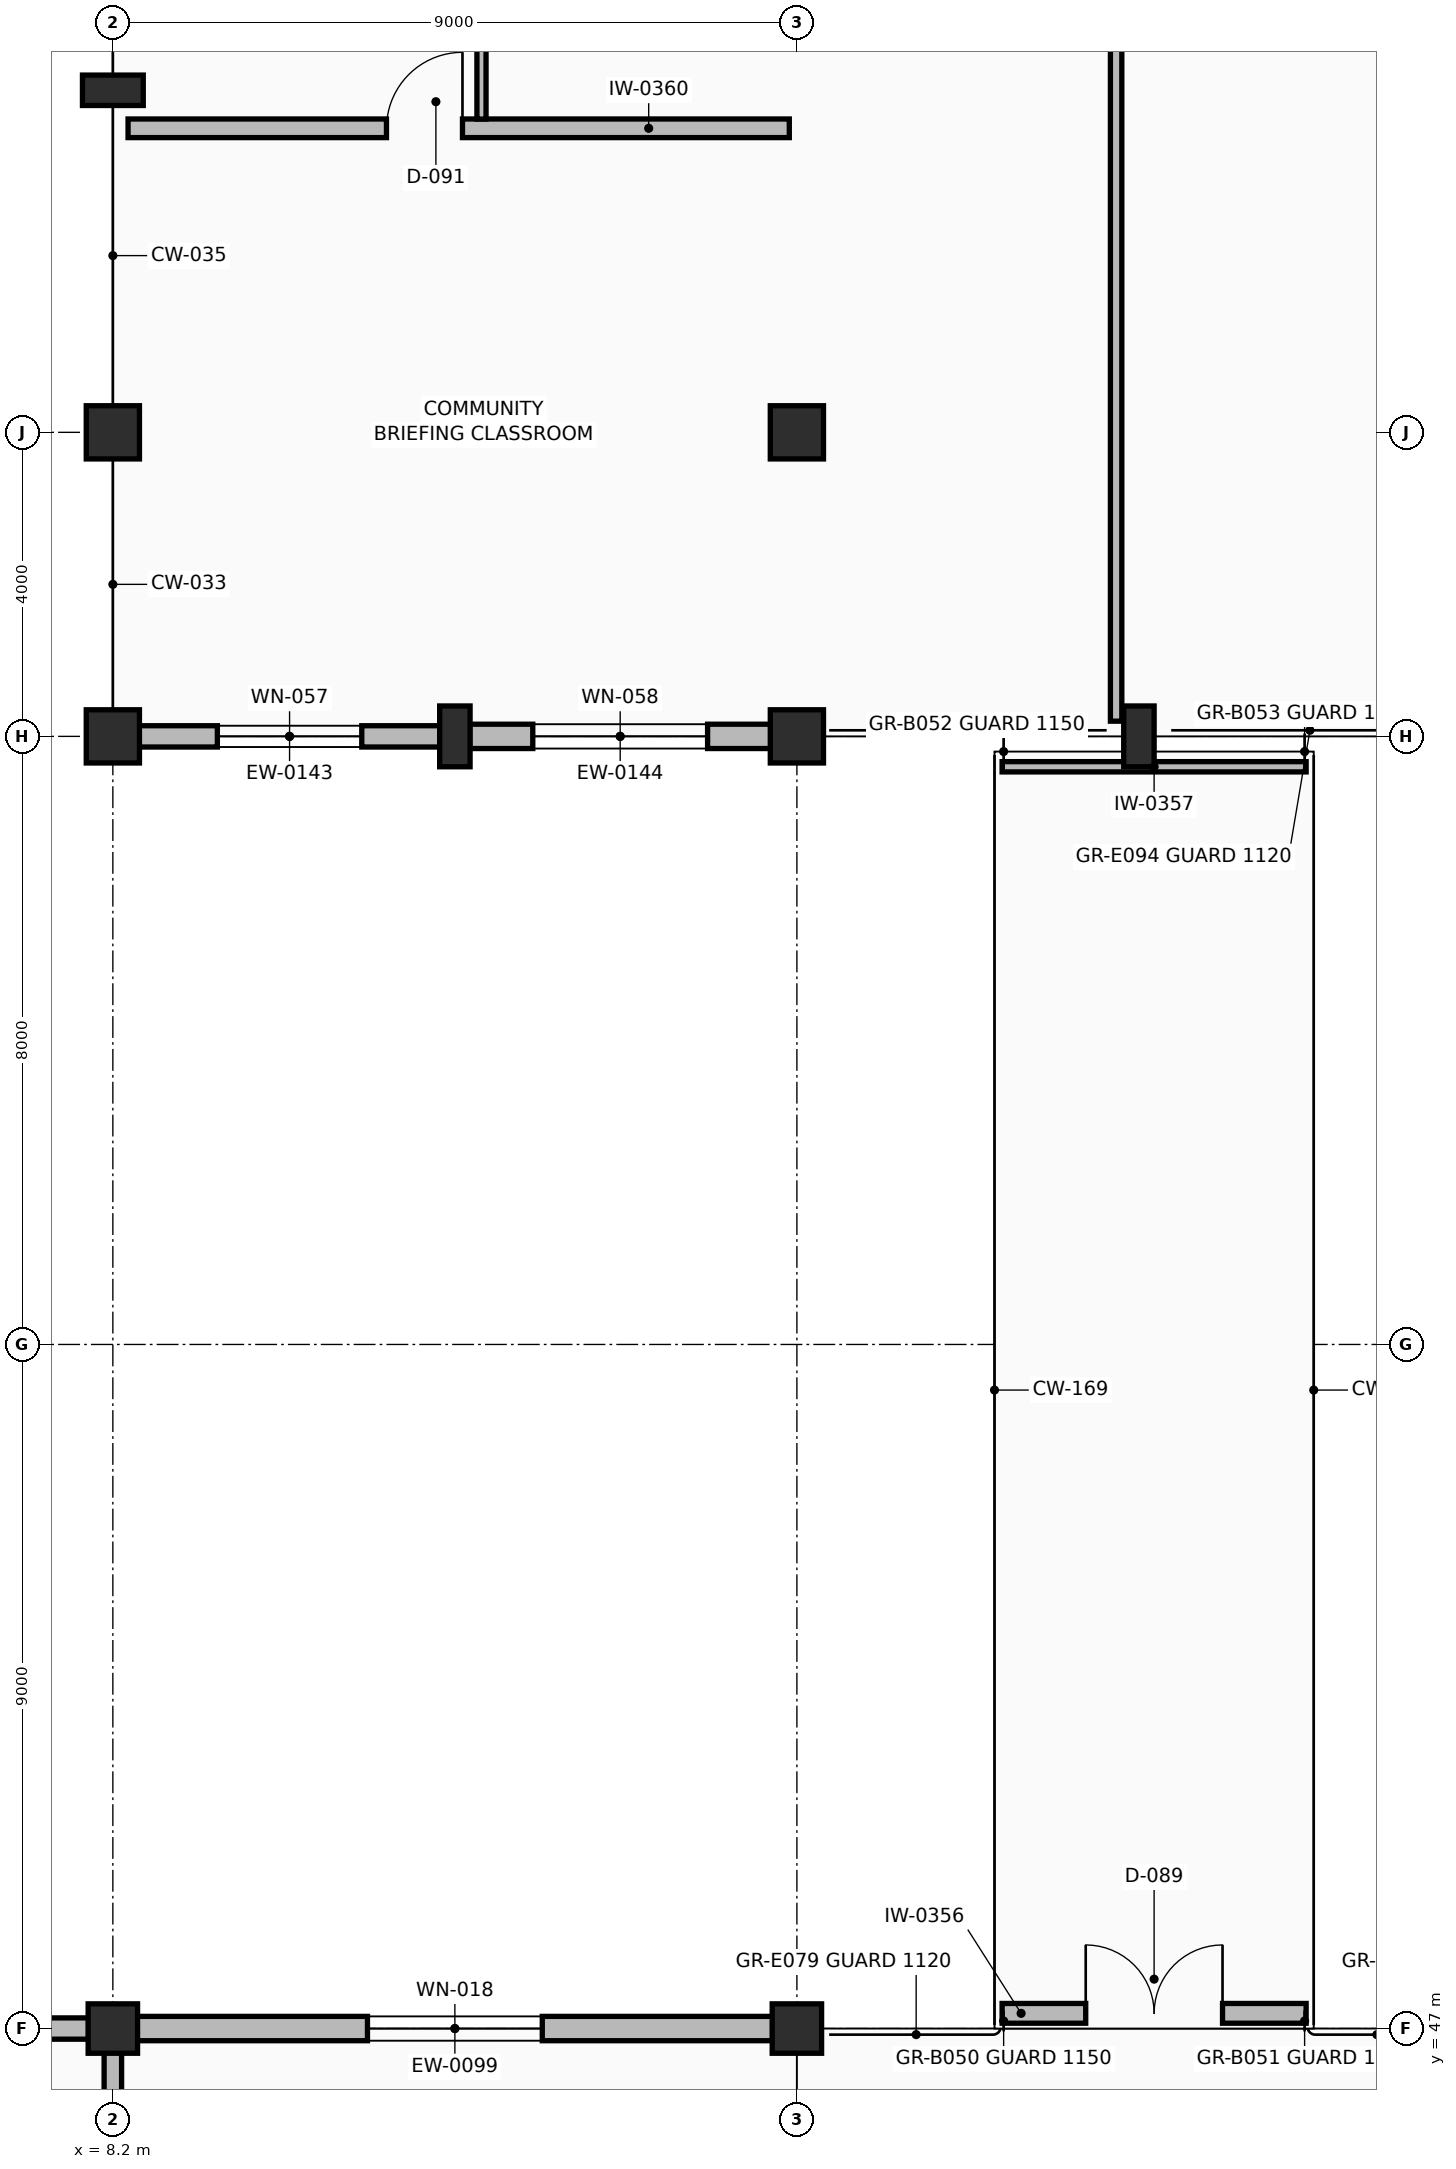
"""IFC4 building model, lengths in metres.
Left out: names, types, materials, properties, quantities, classifications, styles, units other than length and angle.
Written with IfcOpenShell. Run it as: python <this file> out.ifc"""

import sys

from ifc_helpers import new_model, si_unit, direction, frame, frame_2d, origin, origin_2d, place, context, subcontext, project, spatial, rectangle, extrude, element, fill, save


model = new_model("IFC4")
c1 = context("Model", 3, precision=1e-05, world=origin(), true_north=direction((0.0, 1.0)))
c2 = subcontext(c1, "Body", "Model", "MODEL_VIEW")
j1 = project(units=[si_unit("LENGTHUNIT", "METRE"), si_unit("PLANEANGLEUNIT", "RADIAN")], contexts=[c1])
p1 = place(None, origin())
s1 = spatial("IfcSite", under=j1, at=p1, CompositionType="ELEMENT")
p2 = place(p1, origin())
s2 = spatial("IfcBuilding", under=s1, at=p2, CompositionType="ELEMENT")
p3 = place(p2, frame((0.0, 0.0, 4.8)))
s3 = spatial("IfcBuildingStorey", under=s2, at=p3, CompositionType="ELEMENT", Elevation=4.8)
for number, where, z_axis, x_axis in (
    (1, (8.2, 47.0, 0.0), (0.0, 0.0, 1.0), (1.0, 0.0, 0.0)),
    (2, (17.2, 47.0, 0.0), (0.0, 0.0, 1.0), (1.0, 0.0, 0.0)),
):
    element("IfcColumn", number, at=place(p3, frame(where, z_axis=z_axis, x_axis=x_axis)), inside=s3, PredefinedType="COLUMN", context=c2, shape_type="SweptSolid", body=[
        extrude(rectangle(XDim=0.65, YDim=0.65, at=origin_2d()), origin(), (0.0, 0.0, 1.0), 4.8),
    ])
for number, where, z_axis, x_axis in (
    (3, (8.2, 64.0, 0.0), (0.0, 0.0, 1.0), (1.0, 0.0, 0.0)),
    (4, (8.2, 68.0, 0.0), (0.0, 0.0, 1.0), (1.0, 0.0, 0.0)),
    (5, (17.2, 64.0, 0.0), (0.0, 0.0, 1.0), (1.0, 0.0, 0.0)),
    (6, (17.2, 68.0, 0.0), (0.0, 0.0, 1.0), (1.0, 0.0, 0.0)),
):
    element("IfcColumn", number, at=place(p3, frame(where, z_axis=z_axis, x_axis=x_axis)), inside=s3, PredefinedType="COLUMN", context=c2, shape_type="SweptSolid", body=[
        extrude(rectangle(XDim=0.7, YDim=0.7, at=origin_2d()), origin(), (0.0, 0.0, 1.0), 4.8),
    ])
for number, where, z_axis, x_axis in (
    (7, (12.7, 64.0, 0.0), (0.0, 0.0, 1.0), (1.0, 0.0, 0.0)),
    (8, (21.7, 64.0, 0.0), (0.0, 0.0, 1.0), (1.0, 0.0, 0.0)),
    (9, (8.2, 72.5, 0.0), (0.0, 0.0, 1.0), (0.0, 1.0, 0.0)),
):
    element("IfcColumn", number, at=place(p3, frame(where, z_axis=z_axis, x_axis=x_axis)), inside=s3, PredefinedType="PILASTER", context=c2, shape_type="SweptSolid", body=[
        extrude(rectangle(XDim=0.4, YDim=0.8, at=origin_2d()), origin(), (0.0, 0.0, 1.0), 4.8),
    ])
p4 = place(p3, frame((7.88, 47.0, 0.0), z_axis=(0.0, 0.0, 1.0), x_axis=(-1.0, 0.0, 0.0)))
e10 = element("IfcWall", 10, at=p4, inside=s3, PredefinedType="SOLIDWALL", context=c2, shape_type="SweptSolid", body=[
    extrude(rectangle(XDim=4.56, YDim=0.28, at=frame_2d((2.28, 0.0))), origin(), (0.0, 0.0, 1.0), 3.675),
])
p5 = place(p4, frame((1.33, 0.0, 0.9)))
e11 = element("IfcOpeningElement", 11, at=p5, cuts=e10, PredefinedType="OPENING", context=c2, shape_type="SweptSolid", body=[
    extrude(rectangle(XDim=1.9, YDim=1.55, at=frame_2d((0.95, 0.775))), frame((0.0, 0.15, 0.0), z_axis=(0.0, -1.0, 0.0), x_axis=(1.0, 0.0, 0.0)), (0.0, 0.0, 1.0), 0.3),
])
p6 = place(p3, frame((16.88, 47.0, 0.0), z_axis=(0.0, 0.0, 1.0), x_axis=(-1.0, 0.0, 0.0)))
e12 = element("IfcWall", 12, at=p6, inside=s3, PredefinedType="SOLIDWALL", context=c2, shape_type="SweptSolid", body=[
    extrude(rectangle(XDim=8.36, YDim=0.32, at=frame_2d((4.18, 0.0))), origin(), (0.0, 0.0, 1.0), 2.752),
])
p7 = place(p6, frame((3.03, 0.0, 0.9)))
e13 = element("IfcOpeningElement", 13, at=p7, cuts=e12, PredefinedType="OPENING", context=c2, shape_type="SweptSolid", body=[
    extrude(rectangle(XDim=2.3, YDim=1.5, at=frame_2d((1.15, 0.75))), frame((0.0, 0.17, 0.0), z_axis=(0.0, -1.0, 0.0), x_axis=(1.0, 0.0, 0.0)), (0.0, 0.0, 1.0), 0.34),
])
p8 = place(p3, frame((8.545, 64.0, 0.0), z_axis=(0.0, 0.0, 1.0), x_axis=(1.0, 0.0, 0.0)))
e14 = element("IfcWall", 14, at=p8, inside=s3, PredefinedType="SOLIDWALL", context=c2, shape_type="SweptSolid", body=[
    extrude(rectangle(XDim=3.96, YDim=0.28, at=frame_2d((1.98, 0.0))), origin(), (0.0, 0.0, 1.0), 2.752),
])
p9 = place(p8, frame((1.03, 0.0, 0.9)))
e15 = element("IfcOpeningElement", 15, at=p9, cuts=e14, PredefinedType="OPENING", context=c2, shape_type="SweptSolid", body=[
    extrude(rectangle(XDim=1.9, YDim=1.55, at=frame_2d((0.95, 0.775))), frame((0.0, 0.15, 0.0), z_axis=(0.0, -1.0, 0.0), x_axis=(1.0, 0.0, 0.0)), (0.0, 0.0, 1.0), 0.3),
])
p10 = place(p3, frame((12.895, 64.0, 0.0), z_axis=(0.0, 0.0, 1.0), x_axis=(1.0, 0.0, 0.0)))
e16 = element("IfcWall", 16, at=p10, inside=s3, PredefinedType="SOLIDWALL", context=c2, shape_type="SweptSolid", body=[
    extrude(rectangle(XDim=3.96, YDim=0.32, at=frame_2d((1.98, 0.0))), origin(), (0.0, 0.0, 1.0), 2.752),
])
p11 = place(p10, frame((0.83, 0.0, 0.9)))
e17 = element("IfcOpeningElement", 17, at=p11, cuts=e16, PredefinedType="OPENING", context=c2, shape_type="SweptSolid", body=[
    extrude(rectangle(XDim=2.3, YDim=1.5, at=frame_2d((1.15, 0.75))), frame((0.0, 0.17, 0.0), z_axis=(0.0, -1.0, 0.0), x_axis=(1.0, 0.0, 0.0)), (0.0, 0.0, 1.0), 0.34),
])
p12 = place(p3, frame((8.2, 30.098, 0.0), z_axis=(0.0, 0.0, 1.0), x_axis=(0.0, 1.0, 0.0)))
e18 = element("IfcWall", 18, at=p12, inside=s3, PredefinedType="PARTITIONING", context=c2, shape_type="SweptSolid", body=[
    extrude(rectangle(XDim=16.702, YDim=0.23, at=frame_2d((8.351, 0.0))), origin(), (0.0, 0.0, 1.0), 3.6),
])
p13 = place(p12, frame((8.726, 0.0, 0.0)))
e19 = element("IfcOpeningElement", 19, at=p13, cuts=e18, PredefinedType="OPENING", context=c2, shape_type="SweptSolid", body=[
    extrude(rectangle(XDim=1.05, YDim=2.15, at=frame_2d((0.525, 1.075))), frame((0.0, 0.125, 0.0), z_axis=(0.0, -1.0, 0.0), x_axis=(1.0, 0.0, 0.0)), (0.0, 0.0, 1.0), 0.25),
])
p14 = place(p3, frame((19.9, 47.2, 0.0), z_axis=(0.0, 0.0, 1.0), x_axis=(1.0, 0.0, 0.0)))
e20 = element("IfcWall", 20, at=p14, inside=s3, PredefinedType="PARTITIONING", context=c2, shape_type="SweptSolid", body=[
    extrude(rectangle(XDim=4.0, YDim=0.26, at=frame_2d((2.0, 0.0))), origin(), (0.0, 0.0, 1.0), 2.742),
])
p15 = place(p14, frame((1.1, 0.0, 0.0)))
e21 = element("IfcOpeningElement", 21, at=p15, cuts=e20, PredefinedType="OPENING", context=c2, shape_type="SweptSolid", body=[
    extrude(rectangle(XDim=1.8, YDim=2.3, at=frame_2d((0.9, 1.15))), frame((0.0, 0.14, 0.0), z_axis=(0.0, -1.0, 0.0), x_axis=(1.0, 0.0, 0.0)), (0.0, 0.0, 1.0), 0.28),
])
p16 = place(p3, frame((19.9, 63.6, 0.0), z_axis=(0.0, 0.0, 1.0), x_axis=(1.0, 0.0, 0.0)))
e22 = element("IfcWall", 22, at=p16, inside=s3, PredefinedType="PARTITIONING", context=c2, shape_type="SweptSolid", body=[
    extrude(rectangle(XDim=4.0, YDim=0.135, at=frame_2d((2.0, 0.0))), origin(), (0.0, 0.0, 1.0), 2.742),
])
p17 = place(p3, frame((8.4, 72.0, 0.0), z_axis=(0.0, 0.0, 1.0), x_axis=(1.0, 0.0, 0.0)))
e23 = element("IfcWall", 23, at=p17, inside=s3, PredefinedType="PARTITIONING", context=c2, shape_type="SweptSolid", body=[
    extrude(rectangle(XDim=8.7, YDim=0.245, at=frame_2d((4.35, 0.0))), origin(), (0.0, 0.0, 1.0), 3.762),
])
p18 = place(p17, frame((3.4, 0.0, 0.0)))
e24 = element("IfcOpeningElement", 24, at=p18, cuts=e23, PredefinedType="OPENING", context=c2, shape_type="SweptSolid", body=[
    extrude(rectangle(XDim=1.0, YDim=2.15, at=frame_2d((0.5, 1.075))), frame((0.0, 0.133, 0.0), z_axis=(0.0, -1.0, 0.0), x_axis=(1.0, 0.0, 0.0)), (0.0, 0.0, 1.0), 0.265),
])
p19 = place(p3, frame((13.05, 72.121, 0.0), z_axis=(0.0, 0.0, 1.0), x_axis=(0.0, 1.0, 0.0)))
e25 = element("IfcWall", 25, at=p19, inside=s3, PredefinedType="PARTITIONING", context=c2, shape_type="SweptSolid", body=[
    extrude(rectangle(XDim=5.199, YDim=0.12, at=frame_2d((2.6, 0.0))), origin(), (0.0, 0.0, 1.0), 3.762),
])
p20 = place(p19, frame((2.074, 0.0, 0.0)))
e26 = element("IfcOpeningElement", 26, at=p20, cuts=e25, PredefinedType="OPENING", context=c2, shape_type="SweptSolid", body=[
    extrude(rectangle(XDim=1.05, YDim=2.15, at=frame_2d((0.525, 1.075))), frame((0.0, 0.07, 0.0), z_axis=(0.0, -1.0, 0.0), x_axis=(1.0, 0.0, 0.0)), (0.0, 0.0, 1.0), 0.14),
])
p21 = place(p3, frame((21.4, 64.2, 0.0), z_axis=(0.0, 0.0, 1.0), x_axis=(0.0, 1.0, 0.0)))
e27 = element("IfcWall", 27, at=p21, inside=s3, PredefinedType="PARTITIONING", context=c2, shape_type="SweptSolid", body=[
    extrude(rectangle(XDim=21.8, YDim=0.15, at=frame_2d((10.9, 0.0))), origin(), (0.0, 0.0, 1.0), 3.762),
])
p22 = place(p21, frame((9.9, 0.0, 0.0)))
e28 = element("IfcOpeningElement", 28, at=p22, cuts=e27, PredefinedType="OPENING", context=c2, shape_type="SweptSolid", body=[
    extrude(rectangle(XDim=2.0, YDim=2.4, at=frame_2d((1.0, 1.2))), frame((0.0, 0.085, 0.0), z_axis=(0.0, -1.0, 0.0), x_axis=(1.0, 0.0, 0.0)), (0.0, 0.0, 1.0), 0.17),
])
p23 = place(p7, origin())
e29 = element("IfcWindow", 29, at=p23, inside=s3, PartitioningType="SINGLE_PANEL", PredefinedType="WINDOW", context=c2, shape_type="SweptSolid", body=[
    extrude(rectangle(XDim=2.3, YDim=1.5, at=frame_2d((1.15, 0.75))), frame((0.0, 0.03, 0.0), z_axis=(0.0, -1.0, 0.0), x_axis=(1.0, 0.0, 0.0)), (0.0, 0.0, 1.0), 0.06),
])
fill(e13, e29)
p24 = place(p9, origin())
e30 = element("IfcWindow", 30, at=p24, inside=s3, PartitioningType="SINGLE_PANEL", PredefinedType="WINDOW", context=c2, shape_type="SweptSolid", body=[
    extrude(rectangle(XDim=1.9, YDim=1.55, at=frame_2d((0.95, 0.775))), frame((0.0, 0.03, 0.0), z_axis=(0.0, -1.0, 0.0), x_axis=(1.0, 0.0, 0.0)), (0.0, 0.0, 1.0), 0.06),
])
fill(e15, e30)
p25 = place(p11, origin())
e31 = element("IfcWindow", 31, at=p25, inside=s3, PartitioningType="SINGLE_PANEL", PredefinedType="WINDOW", context=c2, shape_type="SweptSolid", body=[
    extrude(rectangle(XDim=2.3, YDim=1.5, at=frame_2d((1.15, 0.75))), frame((0.0, 0.03, 0.0), z_axis=(0.0, -1.0, 0.0), x_axis=(1.0, 0.0, 0.0)), (0.0, 0.0, 1.0), 0.06),
])
fill(e17, e31)
p26 = place(p15, origin())
e32 = element("IfcDoor", 32, at=p26, inside=s3, OperationType="DOUBLE_SWING_RIGHT", PredefinedType="DOOR", context=c2, shape_type="SweptSolid", body=[
    extrude(rectangle(XDim=1.8, YDim=2.3, at=frame_2d((0.9, 1.15))), frame((0.0, 0.025, 0.0), z_axis=(0.0, -1.0, 0.0), x_axis=(1.0, 0.0, 0.0)), (0.0, 0.0, 1.0), 0.05),
])
fill(e21, e32)
p27 = place(p18, origin())
e33 = element("IfcDoor", 33, at=p27, inside=s3, OperationType="SINGLE_SWING_RIGHT", PredefinedType="DOOR", context=c2, shape_type="SweptSolid", body=[
    extrude(rectangle(XDim=1.0, YDim=2.15, at=frame_2d((0.5, 1.075))), frame((0.0, 0.025, 0.0), z_axis=(0.0, -1.0, 0.0), x_axis=(1.0, 0.0, 0.0)), (0.0, 0.0, 1.0), 0.05),
])
fill(e24, e33)
save(model, sys.argv[1])
